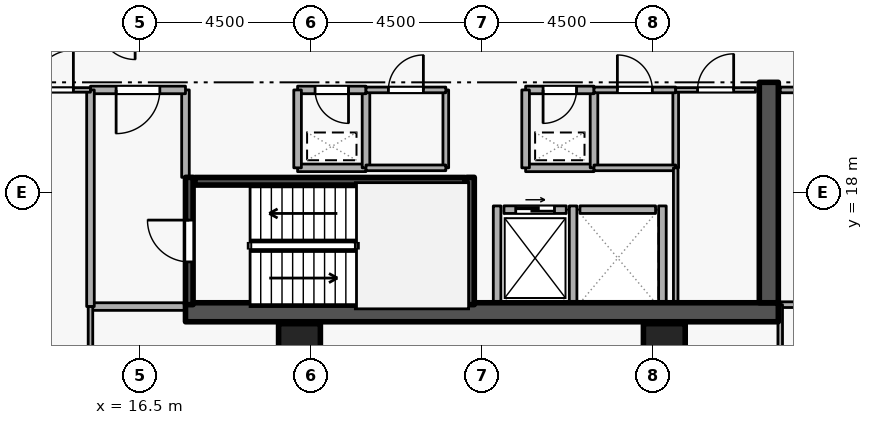
"""IFC4 building model, lengths in metres.
Left out: names, types, materials, properties, quantities, classifications, styles, units other than length and angle.
Written with IfcOpenShell. Run it as: python <this file> out.ifc"""

import sys

from ifc_helpers import new_model, si_unit, direction, frame, frame_2d, origin, origin_2d, place, context, subcontext, project, spatial, rectangle, extrude, element, fill, save


model = new_model("IFC4")
c1 = context("Model", 3, precision=1e-05, world=origin(), true_north=direction((0.0, 1.0)))
c2 = subcontext(c1, "Body", "Model", "MODEL_VIEW")
j1 = project(units=[si_unit("LENGTHUNIT", "METRE"), si_unit("PLANEANGLEUNIT", "RADIAN")], contexts=[c1])
p1 = place(None, origin())
s1 = spatial("IfcSite", under=j1, at=p1, CompositionType="ELEMENT")
p2 = place(p1, origin())
s2 = spatial("IfcBuilding", under=s1, at=p2, CompositionType="ELEMENT")
p3 = place(p2, frame((0.0, 0.0, 170.7)))
s3 = spatial("IfcBuildingStorey", under=s2, at=p3, CompositionType="ELEMENT", Elevation=170.7)
p4 = place(p3, frame((17.7, 14.85, 0.0), z_axis=(0.0, 0.0, 1.0), x_axis=(1.0, 0.0, 0.0)))
e1 = element("IfcWall", 1, at=p4, inside=s3, PredefinedType="SHEAR", context=c2, shape_type="SweptSolid", body=[
    extrude(rectangle(XDim=15.6, YDim=0.5, at=frame_2d((7.8, 0.0))), origin(), (0.0, 0.0, 1.0), 3.6),
])
p5 = place(p3, frame((33.05, 15.1, 0.0), z_axis=(0.0, 0.0, 1.0), x_axis=(0.0, 1.0, 0.0)))
e2 = element("IfcWall", 2, at=p5, inside=s3, PredefinedType="SHEAR", context=c2, shape_type="SweptSolid", body=[
    extrude(rectangle(XDim=5.8, YDim=0.5, at=frame_2d((2.9, 0.0))), origin(), (0.0, 0.0, 1.0), 3.6),
])
for number, where, z_axis, x_axis in (
    (3, (20.7, 14.0, 0.0), (0.0, 0.0, 1.0), (1.0, 0.0, 0.0)),
    (4, (30.3, 14.0, 0.0), (0.0, 0.0, 1.0), (1.0, 0.0, 0.0)),
):
    element("IfcColumn", number, at=place(p3, frame(where, z_axis=z_axis, x_axis=x_axis)), inside=s3, PredefinedType="COLUMN", context=c2, shape_type="SweptSolid", body=[
        extrude(rectangle(XDim=1.1, YDim=1.1, at=origin_2d()), origin(), (0.0, 0.0, 1.0), 3.6),
    ])
p6 = place(p3, frame((26.08, 17.55, 0.0), z_axis=(0.0, 0.0, 1.0), x_axis=(1.0, 0.0, 0.0)))
e5 = element("IfcWall", 5, at=p6, inside=s3, PredefinedType="STANDARD", context=c2, shape_type="SweptSolid", body=[
    extrude(rectangle(XDim=1.64, YDim=0.2, at=frame_2d((0.82, 0.0))), origin(), (0.0, 0.0, 1.0), 3.26),
])
p7 = place(p6, frame((0.31, 0.0, 0.0)))
e6 = element("IfcOpeningElement", 6, at=p7, cuts=e5, PredefinedType="OPENING", context=c2, shape_type="SweptSolid", body=[
    extrude(rectangle(XDim=1.02, YDim=2.06, at=frame_2d((0.51, 1.03))), frame((0.0, 0.11, 0.0), z_axis=(0.0, -1.0, 0.0), x_axis=(1.0, 0.0, 0.0)), (0.0, 0.0, 1.0), 0.22),
])
p8 = place(p3, frame((28.08, 17.55, 0.0), z_axis=(0.0, 0.0, 1.0), x_axis=(1.0, 0.0, 0.0)))
e7 = element("IfcWall", 7, at=p8, inside=s3, PredefinedType="STANDARD", context=c2, shape_type="SweptSolid", body=[
    extrude(rectangle(XDim=1.99, YDim=0.2, at=frame_2d((0.995, 0.0))), origin(), (0.0, 0.0, 1.0), 3.26),
])
for number, where, z_axis, x_axis in (
    (8, (27.9, 15.112, 0.0), (0.0, 0.0, 1.0), (0.0, 1.0, 0.0)),
    (9, (25.9, 15.112, 0.0), (0.0, 0.0, 1.0), (0.0, 1.0, 0.0)),
    (10, (30.25, 15.112, 0.0), (0.0, 0.0, 1.0), (0.0, 1.0, 0.0)),
):
    element("IfcWall", number, at=place(p3, frame(where, z_axis=z_axis, x_axis=x_axis)), inside=s3, PredefinedType="STANDARD", context=c2, shape_type="SweptSolid", body=[
        extrude(rectangle(XDim=2.536, YDim=0.2, at=frame_2d((1.268, 0.0))), origin(), (0.0, 0.0, 1.0), 3.26),
    ])
p9 = place(p3, frame((17.8, 15.05, 0.0), z_axis=(0.0, 0.0, 1.0), x_axis=(0.0, 1.0, 0.0)))
e11 = element("IfcWall", 11, at=p9, inside=s3, PredefinedType="SHEAR", context=c2, shape_type="SweptSolid", body=[
    extrude(rectangle(XDim=3.35, YDim=0.2, at=frame_2d((1.675, 0.0))), origin(), (0.0, 0.0, 1.0), 3.6),
])
p10 = place(p9, frame((1.125, 0.0, 0.0)))
e12 = element("IfcOpeningElement", 12, at=p10, cuts=e11, PredefinedType="OPENING", context=c2, shape_type="SweptSolid", body=[
    extrude(rectangle(XDim=1.1, YDim=2.1, at=frame_2d((0.55, 1.05))), frame((0.0, 0.11, 0.0), z_axis=(0.0, -1.0, 0.0), x_axis=(1.0, 0.0, 0.0)), (0.0, 0.0, 1.0), 0.22),
])
p11 = place(p3, frame((25.2, 18.4, 0.0), z_axis=(0.0, 0.0, 1.0), x_axis=(0.0, -1.0, 0.0)))
e13 = element("IfcWall", 13, at=p11, inside=s3, PredefinedType="SHEAR", context=c2, shape_type="SweptSolid", body=[
    extrude(rectangle(XDim=3.35, YDim=0.2, at=frame_2d((1.675, 0.0))), origin(), (0.0, 0.0, 1.0), 3.6),
])
p12 = place(p3, frame((25.05, 18.297, 0.0), z_axis=(0.0, 0.0, 1.0), x_axis=(-1.0, 0.0, 0.0)))
e14 = element("IfcWall", 14, at=p12, inside=s3, PredefinedType="SHEAR", context=c2, shape_type="SweptSolid", body=[
    extrude(rectangle(XDim=7.1, YDim=0.2, at=frame_2d((3.55, 0.0))), origin(), (0.0, 0.0, 1.0), 3.6),
])
p13 = place(p3, frame((15.2, 15.0, 0.0), z_axis=(0.0, 0.0, 1.0), x_axis=(1.0, 0.0, 0.0)))
e15 = element("IfcWall", 15, at=p13, inside=s3, PredefinedType="STANDARD", context=c2, shape_type="SweptSolid", body=[
    extrude(rectangle(XDim=2.5, YDim=0.2, at=frame_2d((1.25, 0.0))), origin(), (0.0, 0.0, 1.0), 3.26),
])
p14 = place(p3, frame((17.7, 18.4, 0.0), z_axis=(0.0, 0.0, 1.0), x_axis=(0.0, 1.0, 0.0)))
e16 = element("IfcWall", 16, at=p14, inside=s3, PredefinedType="STANDARD", context=c2, shape_type="SweptSolid", body=[
    extrude(rectangle(XDim=2.3, YDim=0.2, at=frame_2d((1.15, 0.0))), origin(), (0.0, 0.0, 1.0), 2.465),
])
p15 = place(p3, frame((17.7, 20.7, 0.0), z_axis=(0.0, 0.0, 1.0), x_axis=(-1.0, 0.0, 0.0)))
e17 = element("IfcWall", 17, at=p15, inside=s3, PredefinedType="STANDARD", context=c2, shape_type="SweptSolid", body=[
    extrude(rectangle(XDim=2.5, YDim=0.2, at=frame_2d((1.25, 0.0))), origin(), (0.0, 0.0, 1.0), 3.26),
])
p16 = place(p15, frame((0.675, 0.0, 0.0)))
e18 = element("IfcOpeningElement", 18, at=p16, cuts=e17, PredefinedType="OPENING", context=c2, shape_type="SweptSolid", body=[
    extrude(rectangle(XDim=1.15, YDim=2.1, at=frame_2d((0.575, 1.05))), frame((0.0, 0.11, 0.0), z_axis=(0.0, -1.0, 0.0), x_axis=(1.0, 0.0, 0.0)), (0.0, 0.0, 1.0), 0.22),
])
p17 = place(p3, frame((15.2, 20.7, 0.0), z_axis=(0.0, 0.0, 1.0), x_axis=(0.0, -1.0, 0.0)))
e19 = element("IfcWall", 19, at=p17, inside=s3, PredefinedType="STANDARD", context=c2, shape_type="SweptSolid", body=[
    extrude(rectangle(XDim=5.7, YDim=0.2, at=frame_2d((2.85, 0.0))), origin(), (0.0, 0.0, 1.0), 3.26),
])
p18 = place(p3, frame((26.65, 18.65, 0.0), z_axis=(0.0, 0.0, 1.0), x_axis=(1.0, 0.0, 0.0)))
e20 = element("IfcWall", 20, at=p18, inside=s3, PredefinedType="STANDARD", context=c2, shape_type="SweptSolid", body=[
    extrude(rectangle(XDim=1.8, YDim=0.2, at=frame_2d((0.9, 0.0))), origin(), (0.0, 0.0, 1.0), 3.26),
])
p19 = place(p3, frame((28.45, 18.65, 0.0), z_axis=(0.0, 0.0, 1.0), x_axis=(0.0, 1.0, 0.0)))
e21 = element("IfcWall", 21, at=p19, inside=s3, PredefinedType="STANDARD", context=c2, shape_type="SweptSolid", body=[
    extrude(rectangle(XDim=2.05, YDim=0.2, at=frame_2d((1.025, 0.0))), origin(), (0.0, 0.0, 1.0), 3.26),
])
p20 = place(p3, frame((28.45, 20.7, 0.0), z_axis=(0.0, 0.0, 1.0), x_axis=(-1.0, 0.0, 0.0)))
e22 = element("IfcWall", 22, at=p20, inside=s3, PredefinedType="STANDARD", context=c2, shape_type="SweptSolid", body=[
    extrude(rectangle(XDim=1.8, YDim=0.2, at=frame_2d((0.9, 0.0))), origin(), (0.0, 0.0, 1.0), 3.26),
])
p21 = place(p20, frame((0.46, 0.0, 0.0)))
e23 = element("IfcOpeningElement", 23, at=p21, cuts=e22, PredefinedType="OPENING", context=c2, shape_type="SweptSolid", body=[
    extrude(rectangle(XDim=0.88, YDim=2.04, at=frame_2d((0.44, 1.02))), frame((0.0, 0.11, 0.0), z_axis=(0.0, -1.0, 0.0), x_axis=(1.0, 0.0, 0.0)), (0.0, 0.0, 1.0), 0.22),
])
p22 = place(p3, frame((26.65, 20.7, 0.0), z_axis=(0.0, 0.0, 1.0), x_axis=(0.0, -1.0, 0.0)))
e24 = element("IfcWall", 24, at=p22, inside=s3, PredefinedType="STANDARD", context=c2, shape_type="SweptSolid", body=[
    extrude(rectangle(XDim=2.05, YDim=0.2, at=frame_2d((1.025, 0.0))), origin(), (0.0, 0.0, 1.0), 3.26),
])
p23 = place(p3, frame((20.65, 18.65, 0.0), z_axis=(0.0, 0.0, 1.0), x_axis=(1.0, 0.0, 0.0)))
e25 = element("IfcWall", 25, at=p23, inside=s3, PredefinedType="STANDARD", context=c2, shape_type="SweptSolid", body=[
    extrude(rectangle(XDim=1.8, YDim=0.2, at=frame_2d((0.9, 0.0))), origin(), (0.0, 0.0, 1.0), 3.26),
])
p24 = place(p3, frame((22.45, 18.65, 0.0), z_axis=(0.0, 0.0, 1.0), x_axis=(0.0, 1.0, 0.0)))
e26 = element("IfcWall", 26, at=p24, inside=s3, PredefinedType="STANDARD", context=c2, shape_type="SweptSolid", body=[
    extrude(rectangle(XDim=2.05, YDim=0.2, at=frame_2d((1.025, 0.0))), origin(), (0.0, 0.0, 1.0), 3.26),
])
p25 = place(p3, frame((22.45, 20.7, 0.0), z_axis=(0.0, 0.0, 1.0), x_axis=(-1.0, 0.0, 0.0)))
e27 = element("IfcWall", 27, at=p25, inside=s3, PredefinedType="STANDARD", context=c2, shape_type="SweptSolid", body=[
    extrude(rectangle(XDim=1.8, YDim=0.2, at=frame_2d((0.9, 0.0))), origin(), (0.0, 0.0, 1.0), 3.26),
])
p26 = place(p25, frame((0.46, 0.0, 0.0)))
e28 = element("IfcOpeningElement", 28, at=p26, cuts=e27, PredefinedType="OPENING", context=c2, shape_type="SweptSolid", body=[
    extrude(rectangle(XDim=0.88, YDim=2.04, at=frame_2d((0.44, 1.02))), frame((0.0, 0.11, 0.0), z_axis=(0.0, -1.0, 0.0), x_axis=(1.0, 0.0, 0.0)), (0.0, 0.0, 1.0), 0.22),
])
p27 = place(p3, frame((20.65, 20.7, 0.0), z_axis=(0.0, 0.0, 1.0), x_axis=(0.0, -1.0, 0.0)))
e29 = element("IfcWall", 29, at=p27, inside=s3, PredefinedType="STANDARD", context=c2, shape_type="SweptSolid", body=[
    extrude(rectangle(XDim=2.05, YDim=0.2, at=frame_2d((1.025, 0.0))), origin(), (0.0, 0.0, 1.0), 3.26),
])
p28 = place(p3, frame((24.55, 20.7, 0.0), z_axis=(0.0, 0.0, 1.0), x_axis=(0.0, -1.0, 0.0)))
e30 = element("IfcWall", 30, at=p28, inside=s3, PredefinedType="PARTITIONING", context=c2, shape_type="SweptSolid", body=[
    extrude(rectangle(XDim=2.05, YDim=0.15, at=frame_2d((1.025, 0.0))), origin(), (0.0, 0.0, 1.0), 3.26),
])
p29 = place(p3, frame((24.55, 18.65, 0.0), z_axis=(0.0, 0.0, 1.0), x_axis=(-1.0, 0.0, 0.0)))
e31 = element("IfcWall", 31, at=p29, inside=s3, PredefinedType="PARTITIONING", context=c2, shape_type="SweptSolid", body=[
    extrude(rectangle(XDim=2.1, YDim=0.15, at=frame_2d((1.05, 0.0))), origin(), (0.0, 0.0, 1.0), 3.26),
])
p30 = place(p3, frame((22.45, 20.7, 0.0), z_axis=(0.0, 0.0, 1.0), x_axis=(1.0, 0.0, 0.0)))
e32 = element("IfcWall", 32, at=p30, inside=s3, PredefinedType="PARTITIONING", context=c2, shape_type="SweptSolid", body=[
    extrude(rectangle(XDim=2.1, YDim=0.15, at=frame_2d((1.05, 0.0))), origin(), (0.0, 0.0, 1.0), 3.26),
])
p31 = place(p30, frame((0.59, 0.0, 0.0)))
e33 = element("IfcOpeningElement", 33, at=p31, cuts=e32, PredefinedType="OPENING", context=c2, shape_type="SweptSolid", body=[
    extrude(rectangle(XDim=0.92, YDim=2.08, at=frame_2d((0.46, 1.04))), frame((0.0, 0.085, 0.0), z_axis=(0.0, -1.0, 0.0), x_axis=(1.0, 0.0, 0.0)), (0.0, 0.0, 1.0), 0.17),
])
p32 = place(p3, frame((30.6, 20.7, 0.0), z_axis=(0.0, 0.0, 1.0), x_axis=(0.0, -1.0, 0.0)))
e34 = element("IfcWall", 34, at=p32, inside=s3, PredefinedType="PARTITIONING", context=c2, shape_type="SweptSolid", body=[
    extrude(rectangle(XDim=2.05, YDim=0.15, at=frame_2d((1.025, 0.0))), origin(), (0.0, 0.0, 1.0), 3.26),
])
p33 = place(p3, frame((30.6, 18.65, 0.0), z_axis=(0.0, 0.0, 1.0), x_axis=(-1.0, 0.0, 0.0)))
e35 = element("IfcWall", 35, at=p33, inside=s3, PredefinedType="PARTITIONING", context=c2, shape_type="SweptSolid", body=[
    extrude(rectangle(XDim=2.15, YDim=0.15, at=frame_2d((1.075, 0.0))), origin(), (0.0, 0.0, 1.0), 3.26),
])
p34 = place(p3, frame((28.45, 20.7, 0.0), z_axis=(0.0, 0.0, 1.0), x_axis=(1.0, 0.0, 0.0)))
e36 = element("IfcWall", 36, at=p34, inside=s3, PredefinedType="PARTITIONING", context=c2, shape_type="SweptSolid", body=[
    extrude(rectangle(XDim=2.15, YDim=0.15, at=frame_2d((1.075, 0.0))), origin(), (0.0, 0.0, 1.0), 3.26),
])
p35 = place(p34, frame((0.615, 0.0, 0.0)))
e37 = element("IfcOpeningElement", 37, at=p35, cuts=e36, PredefinedType="OPENING", context=c2, shape_type="SweptSolid", body=[
    extrude(rectangle(XDim=0.92, YDim=2.08, at=frame_2d((0.46, 1.04))), frame((0.0, 0.085, 0.0), z_axis=(0.0, -1.0, 0.0), x_axis=(1.0, 0.0, 0.0)), (0.0, 0.0, 1.0), 0.17),
])
p36 = place(p3, frame((30.6, 15.1, 0.0), z_axis=(0.0, 0.0, 1.0), x_axis=(0.0, 1.0, 0.0)))
e38 = element("IfcWall", 38, at=p36, inside=s3, PredefinedType="PARTITIONING", context=c2, shape_type="SweptSolid", body=[
    extrude(rectangle(XDim=3.55, YDim=0.12, at=frame_2d((1.775, 0.0))), origin(), (0.0, 0.0, 1.0), 3.26),
])
p37 = place(p3, frame((30.6, 20.7, 0.0), z_axis=(0.0, 0.0, 1.0), x_axis=(1.0, 0.0, 0.0)))
e39 = element("IfcWall", 39, at=p37, inside=s3, PredefinedType="PARTITIONING", context=c2, shape_type="SweptSolid", body=[
    extrude(rectangle(XDim=2.1, YDim=0.12, at=frame_2d((1.05, 0.0))), origin(), (0.0, 0.0, 1.0), 3.26),
])
p38 = place(p37, frame((0.575, 0.0, 0.0)))
e40 = element("IfcOpeningElement", 40, at=p38, cuts=e39, PredefinedType="OPENING", context=c2, shape_type="SweptSolid", body=[
    extrude(rectangle(XDim=0.95, YDim=2.1, at=frame_2d((0.475, 1.05))), frame((0.0, 0.07, 0.0), z_axis=(0.0, -1.0, 0.0), x_axis=(1.0, 0.0, 0.0)), (0.0, 0.0, 1.0), 0.14),
])
p39 = place(p3, frame((35.75, 15.05, 0.0), z_axis=(0.0, 0.0, 1.0), x_axis=(-1.0, 0.0, 0.0)))
e41 = element("IfcWall", 41, at=p39, inside=s3, PredefinedType="PARTITIONING", context=c2, shape_type="SweptSolid", body=[
    extrude(rectangle(XDim=2.4, YDim=0.15, at=frame_2d((1.2, 0.0))), origin(), (0.0, 0.0, 1.0), 3.26),
])
p40 = place(p3, frame((33.35, 20.7, 0.0), z_axis=(0.0, 0.0, 1.0), x_axis=(1.0, 0.0, 0.0)))
e42 = element("IfcWall", 42, at=p40, inside=s3, PredefinedType="PARTITIONING", context=c2, shape_type="SweptSolid", body=[
    extrude(rectangle(XDim=2.4, YDim=0.15, at=frame_2d((1.2, 0.0))), origin(), (0.0, 0.0, 1.0), 3.26),
])
p41 = place(p40, frame((0.725, 0.0, 0.0)))
e43 = element("IfcOpeningElement", 43, at=p41, cuts=e42, PredefinedType="OPENING", context=c2, shape_type="SweptSolid", body=[
    extrude(rectangle(XDim=0.95, YDim=2.1, at=frame_2d((0.475, 1.05))), frame((0.0, 0.085, 0.0), z_axis=(0.0, -1.0, 0.0), x_axis=(1.0, 0.0, 0.0)), (0.0, 0.0, 1.0), 0.17),
])
p42 = place(p3, frame((13.25, 20.7, 0.0), z_axis=(0.0, 0.0, 1.0), x_axis=(1.0, 0.0, 0.0)))
e44 = element("IfcWall", 44, at=p42, inside=s3, PredefinedType="PARTITIONING", context=c2, shape_type="SweptSolid", body=[
    extrude(rectangle(XDim=1.95, YDim=0.12, at=frame_2d((0.975, 0.0))), origin(), (0.0, 0.0, 1.0), 3.26),
])
p43 = place(p42, frame((0.45, 0.0, 0.0)))
e45 = element("IfcOpeningElement", 45, at=p43, cuts=e44, PredefinedType="OPENING", context=c2, shape_type="SweptSolid", body=[
    extrude(rectangle(XDim=1.05, YDim=2.1, at=frame_2d((0.525, 1.05))), frame((0.0, 0.07, 0.0), z_axis=(0.0, -1.0, 0.0), x_axis=(1.0, 0.0, 0.0)), (0.0, 0.0, 1.0), 0.14),
])
p44 = place(p3, frame((15.2, 15.0, 0.0), z_axis=(0.0, 0.0, 1.0), x_axis=(0.0, -1.0, 0.0)))
e46 = element("IfcWall", 46, at=p44, inside=s3, PredefinedType="PARTITIONING", context=c2, shape_type="SweptSolid", body=[
    extrude(rectangle(XDim=11.72, YDim=0.12, at=frame_2d((5.86, 0.0))), origin(), (0.0, 0.0, 1.0), 3.26),
])
p45 = place(p3, frame((33.35, 3.28, 0.0), z_axis=(0.0, 0.0, 1.0), x_axis=(0.0, 1.0, 0.0)))
e47 = element("IfcWall", 47, at=p45, inside=s3, PredefinedType="PARTITIONING", context=c2, shape_type="SweptSolid", body=[
    extrude(rectangle(XDim=11.77, YDim=0.12, at=frame_2d((5.885, 0.0))), origin(), (0.0, 0.0, 1.0), 2.465),
])
p46 = place(p7, origin())
e48 = element("IfcDoor", 48, at=p46, inside=s3, OperationType="SLIDING_TO_LEFT", PredefinedType="DOOR", context=c2, shape_type="SweptSolid", body=[
    extrude(rectangle(XDim=1.02, YDim=2.06, at=frame_2d((0.51, 1.03))), frame((0.0, 0.025, 0.0), z_axis=(0.0, -1.0, 0.0), x_axis=(1.0, 0.0, 0.0)), (0.0, 0.0, 1.0), 0.05),
])
fill(e6, e48)
p47 = place(p10, origin())
e49 = element("IfcDoor", 49, at=p47, inside=s3, OperationType="SINGLE_SWING_RIGHT", PredefinedType="DOOR", context=c2, shape_type="SweptSolid", body=[
    extrude(rectangle(XDim=1.1, YDim=2.1, at=frame_2d((0.55, 1.05))), frame((0.0, 0.025, 0.0), z_axis=(0.0, -1.0, 0.0), x_axis=(1.0, 0.0, 0.0)), (0.0, 0.0, 1.0), 0.05),
])
fill(e12, e49)
p48 = place(p16, origin())
e50 = element("IfcDoor", 50, at=p48, inside=s3, OperationType="SINGLE_SWING_RIGHT", PredefinedType="DOOR", context=c2, shape_type="SweptSolid", body=[
    extrude(rectangle(XDim=1.15, YDim=2.1, at=frame_2d((0.575, 1.05))), frame((0.0, 0.025, 0.0), z_axis=(0.0, -1.0, 0.0), x_axis=(1.0, 0.0, 0.0)), (0.0, 0.0, 1.0), 0.05),
])
fill(e18, e50)
p49 = place(p21, origin())
e51 = element("IfcDoor", 51, at=p49, inside=s3, OperationType="SINGLE_SWING_RIGHT", PredefinedType="DOOR", context=c2, shape_type="SweptSolid", body=[
    extrude(rectangle(XDim=0.88, YDim=2.04, at=frame_2d((0.44, 1.02))), frame((0.0, 0.025, 0.0), z_axis=(0.0, -1.0, 0.0), x_axis=(1.0, 0.0, 0.0)), (0.0, 0.0, 1.0), 0.05),
])
fill(e23, e51)
p50 = place(p26, origin())
e52 = element("IfcDoor", 52, at=p50, inside=s3, OperationType="SINGLE_SWING_LEFT", PredefinedType="DOOR", context=c2, shape_type="SweptSolid", body=[
    extrude(rectangle(XDim=0.88, YDim=2.04, at=frame_2d((0.44, 1.02))), frame((0.0, 0.025, 0.0), z_axis=(0.0, -1.0, 0.0), x_axis=(1.0, 0.0, 0.0)), (0.0, 0.0, 1.0), 0.05),
])
fill(e28, e52)
p51 = place(p31, origin())
e53 = element("IfcDoor", 53, at=p51, inside=s3, OperationType="SINGLE_SWING_RIGHT", PredefinedType="DOOR", context=c2, shape_type="SweptSolid", body=[
    extrude(rectangle(XDim=0.92, YDim=2.08, at=frame_2d((0.46, 1.04))), frame((0.0, 0.025, 0.0), z_axis=(0.0, -1.0, 0.0), x_axis=(1.0, 0.0, 0.0)), (0.0, 0.0, 1.0), 0.05),
])
fill(e33, e53)
p52 = place(p35, origin())
e54 = element("IfcDoor", 54, at=p52, inside=s3, OperationType="SINGLE_SWING_LEFT", PredefinedType="DOOR", context=c2, shape_type="SweptSolid", body=[
    extrude(rectangle(XDim=0.92, YDim=2.08, at=frame_2d((0.46, 1.04))), frame((0.0, 0.025, 0.0), z_axis=(0.0, -1.0, 0.0), x_axis=(1.0, 0.0, 0.0)), (0.0, 0.0, 1.0), 0.05),
])
fill(e37, e54)
p53 = place(p38, origin())
e55 = element("IfcDoor", 55, at=p53, inside=s3, OperationType="SINGLE_SWING_RIGHT", PredefinedType="DOOR", context=c2, shape_type="SweptSolid", body=[
    extrude(rectangle(XDim=0.95, YDim=2.1, at=frame_2d((0.475, 1.05))), frame((0.0, 0.025, 0.0), z_axis=(0.0, -1.0, 0.0), x_axis=(1.0, 0.0, 0.0)), (0.0, 0.0, 1.0), 0.05),
])
fill(e40, e55)
p54 = place(p43, origin())
e56 = element("IfcDoor", 56, at=p54, inside=s3, OperationType="SINGLE_SWING_RIGHT", PredefinedType="DOOR", context=c2, shape_type="SweptSolid", body=[
    extrude(rectangle(XDim=1.05, YDim=2.1, at=frame_2d((0.525, 1.05))), frame((0.0, 0.025, 0.0), z_axis=(0.0, -1.0, 0.0), x_axis=(1.0, 0.0, 0.0)), (0.0, 0.0, 1.0), 0.05),
])
fill(e45, e56)
save(model, sys.argv[1])
